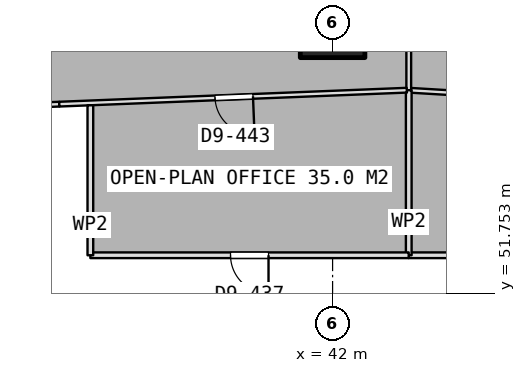
"""IFC4 building model, lengths in metres.
Left out: names, types, materials, properties, quantities, classifications, styles, units other than length and angle.
Written with IfcOpenShell. Run it as: python <this file> out.ifc"""

import sys

from ifc_helpers import new_model, si_unit, direction, frame, frame_2d, origin, origin_2d, place, context, subcontext, project, spatial, rectangle, extrude, element, fill, save


model = new_model("IFC4")
c1 = context("Model", 3, precision=1e-05, world=origin(), true_north=direction((0.0, 1.0)))
c2 = subcontext(c1, "Body", "Model", "MODEL_VIEW")
j1 = project(units=[si_unit("LENGTHUNIT", "METRE"), si_unit("PLANEANGLEUNIT", "RADIAN")], contexts=[c1])
p1 = place(None, origin())
s1 = spatial("IfcSite", under=j1, at=p1, CompositionType="ELEMENT")
p2 = place(p1, origin())
s2 = spatial("IfcBuilding", under=s1, at=p2, CompositionType="ELEMENT")
p3 = place(p2, frame((0.0, 0.0, 117.8)))
s3 = spatial("IfcBuildingStorey", under=s2, at=p3, CompositionType="ELEMENT", Elevation=117.8)
p4 = place(p3, frame((42.0, 58.8, 0.0), z_axis=(0.0, 0.0, 1.0), x_axis=(1.0, 0.0, 0.0)))
e1 = element("IfcColumn", 1, at=p4, inside=s3, PredefinedType="COLUMN", context=c2, shape_type="SweptSolid", body=[
    extrude(rectangle(XDim=1.7, YDim=1.7, at=origin_2d()), origin(), (0.0, 0.0, 1.0), 3.75),
])
p5 = place(p3, frame((51.494, 56.643, 0.0), z_axis=(0.0, 0.0, 1.0), x_axis=(-0.998200446595, 0.059965560255, 0.0)))
e2 = element("IfcWall", 2, at=p5, inside=s3, PredefinedType="PARTITIONING", context=c2, shape_type="SweptSolid", body=[
    extrude(rectangle(XDim=7.503, YDim=0.125, at=frame_2d((3.752, 0.0))), origin(), (0.0, 0.0, 1.0), 3.5),
])
p6 = place(p5, frame((3.252, 0.0, 0.0)))
e3 = element("IfcOpeningElement", 3, at=p6, cuts=e2, PredefinedType="OPENING", context=c2, shape_type="SweptSolid", body=[
    extrude(rectangle(XDim=1.0, YDim=2.1, at=frame_2d((0.5, 1.05))), frame((0.0, 0.073, 0.0), z_axis=(0.0, -1.0, 0.0), x_axis=(1.0, 0.0, 0.0)), (0.0, 0.0, 1.0), 0.145),
])
p7 = place(p3, frame((44.004, 57.093, 0.0), z_axis=(0.0, 0.0, 1.0), x_axis=(0.0, 1.0, 0.0)))
e4 = element("IfcWall", 4, at=p7, inside=s3, PredefinedType="PARTITIONING", context=c2, shape_type="SweptSolid", body=[
    extrude(rectangle(XDim=4.726, YDim=0.125, at=frame_2d((2.363, 0.0))), origin(), (0.0, 0.0, 1.0), 3.5),
])
p8 = place(p3, frame((53.2, 52.75, 0.0), z_axis=(0.0, 0.0, 1.0), x_axis=(-1.0, 0.0, 0.0)))
e5 = element("IfcWall", 5, at=p8, inside=s3, PredefinedType="PARTITIONING", context=c2, shape_type="SweptSolid", body=[
    extrude(rectangle(XDim=9.196, YDim=0.15, at=frame_2d((4.598, 0.0))), origin(), (0.0, 0.0, 1.0), 3.5),
])
p9 = place(p3, frame((44.004, 52.75, 0.0), z_axis=(0.0, 0.0, 1.0), x_axis=(0.0, 1.0, 0.0)))
e6 = element("IfcWall", 6, at=p9, inside=s3, PredefinedType="PARTITIONING", context=c2, shape_type="SweptSolid", body=[
    extrude(rectangle(XDim=4.343, YDim=0.15, at=frame_2d((2.171, 0.0))), origin(), (0.0, 0.0, 1.0), 3.5),
])
p10 = place(p3, frame((34.808, 56.726, 0.0), z_axis=(0.0, 0.0, 1.0), x_axis=(-0.999206910902, -0.039818955354, 0.0)))
e7 = element("IfcWall", 7, at=p10, inside=s3, PredefinedType="PARTITIONING", context=c2, shape_type="SweptSolid", body=[
    extrude(rectangle(XDim=0.981, YDim=0.125, at=frame_2d((0.49, 0.0))), origin(), (0.0, 0.0, 1.0), 3.5),
])
p11 = place(p3, frame((43.953, 57.093, 0.0), z_axis=(0.0, 0.0, 1.0), x_axis=(-0.999195922466, -0.040093746735, 0.0)))
e8 = element("IfcWall", 8, at=p11, inside=s3, PredefinedType="PARTITIONING", context=c2, shape_type="SweptSolid", body=[
    extrude(rectangle(XDim=9.152, YDim=0.125, at=frame_2d((4.576, 0.0))), origin(), (0.0, 0.0, 1.0), 3.5),
])
p12 = place(p11, frame((4.051, 0.0, 0.0)))
e9 = element("IfcOpeningElement", 9, at=p12, cuts=e8, PredefinedType="OPENING", context=c2, shape_type="SweptSolid", body=[
    extrude(rectangle(XDim=1.0, YDim=2.1, at=frame_2d((0.5, 1.05))), frame((0.0, 0.073, 0.0), z_axis=(0.0, -1.0, 0.0), x_axis=(1.0, 0.0, 0.0)), (0.0, 0.0, 1.0), 0.145),
])
p13 = place(p3, frame((44.003, 52.75, 0.0), z_axis=(0.0, 0.0, 1.0), x_axis=(-1.0, 0.0, 0.0)))
e10 = element("IfcWall", 10, at=p13, inside=s3, PredefinedType="PARTITIONING", context=c2, shape_type="SweptSolid", body=[
    extrude(rectangle(XDim=8.377, YDim=0.15, at=frame_2d((4.188, 0.0))), origin(), (0.0, 0.0, 1.0), 3.5),
])
p14 = place(p13, frame((3.689, 0.0, 0.0)))
e11 = element("IfcOpeningElement", 11, at=p14, cuts=e10, PredefinedType="OPENING", context=c2, shape_type="SweptSolid", body=[
    extrude(rectangle(XDim=1.0, YDim=2.1, at=frame_2d((0.5, 1.05))), frame((0.0, 0.085, 0.0), z_axis=(0.0, -1.0, 0.0), x_axis=(1.0, 0.0, 0.0)), (0.0, 0.0, 1.0), 0.17),
])
p15 = place(p3, frame((35.626, 52.75, 0.0), z_axis=(0.0, 0.0, 1.0), x_axis=(0.0, 1.0, 0.0)))
e12 = element("IfcWall", 12, at=p15, inside=s3, PredefinedType="PARTITIONING", context=c2, shape_type="SweptSolid", body=[
    extrude(rectangle(XDim=3.946, YDim=0.15, at=frame_2d((1.973, 0.0))), origin(), (0.0, 0.0, 1.0), 3.5),
])
p16 = place(p12, origin())
e13 = element("IfcDoor", 13, at=p16, inside=s3, OperationType="SINGLE_SWING_LEFT", PredefinedType="DOOR", context=c2, shape_type="SweptSolid", body=[
    extrude(rectangle(XDim=1.0, YDim=2.1, at=frame_2d((0.5, 1.05))), frame((0.0, 0.025, 0.0), z_axis=(0.0, -1.0, 0.0), x_axis=(1.0, 0.0, 0.0)), (0.0, 0.0, 1.0), 0.05),
])
fill(e9, e13)
p17 = place(p14, origin())
e14 = element("IfcDoor", 14, at=p17, inside=s3, OperationType="SINGLE_SWING_LEFT", PredefinedType="DOOR", context=c2, shape_type="SweptSolid", body=[
    extrude(rectangle(XDim=1.0, YDim=2.1, at=frame_2d((0.5, 1.05))), frame((0.0, 0.025, 0.0), z_axis=(0.0, -1.0, 0.0), x_axis=(1.0, 0.0, 0.0)), (0.0, 0.0, 1.0), 0.05),
])
fill(e11, e14)
save(model, sys.argv[1])
